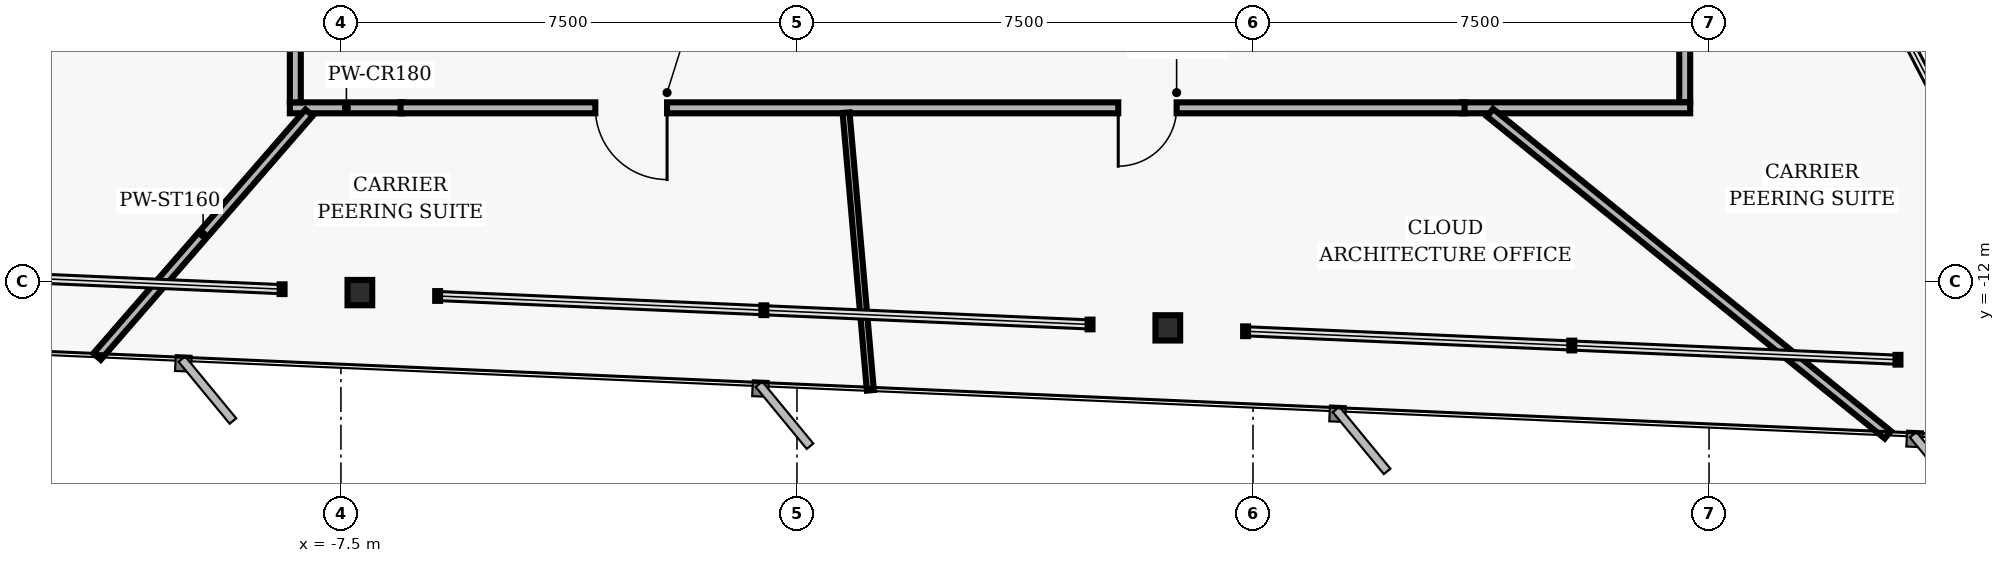
"""IFC4 building model, lengths in metres.
Left out: names, types, materials, properties, quantities, classifications, styles, units other than length and angle.
Written with IfcOpenShell. Run it as: python <this file> out.ifc"""

import sys

from ifc_helpers import new_model, si_unit, direction, frame, frame_2d, origin, origin_2d, place, context, subcontext, project, spatial, rectangle, i_section, extrude, element, fill, save


model = new_model("IFC4")
c1 = context("Model", 3, precision=1e-05, world=origin(), true_north=direction((0.0, 1.0)))
c2 = subcontext(c1, "Body", "Model", "MODEL_VIEW")
j1 = project(units=[si_unit("LENGTHUNIT", "METRE"), si_unit("PLANEANGLEUNIT", "RADIAN")], contexts=[c1])
p1 = place(None, origin())
s1 = spatial("IfcSite", under=j1, at=p1, CompositionType="ELEMENT")
p2 = place(p1, origin())
s2 = spatial("IfcBuilding", under=s1, at=p2, CompositionType="ELEMENT")
p3 = place(p2, frame((0.0, 0.0, 132.0)))
s3 = spatial("IfcBuildingStorey", under=s2, at=p3, CompositionType="ELEMENT", Elevation=132.0)
for number, where, z_axis, x_axis in (
    (1, (-7.188, -12.189, 0.0), (0.0, 0.0, 1.0), (1.0, 0.0, 0.0)),
    (2, (6.099, -12.769, 0.0), (0.0, 0.0, 1.0), (1.0, 0.0, 0.0)),
):
    element("IfcColumn", number, at=place(p3, frame(where, z_axis=z_axis, x_axis=x_axis)), inside=s3, PredefinedType="COLUMN", context=c2, shape_type="SweptSolid", body=[
        extrude(i_section(OverallWidth=0.406, OverallDepth=0.416, WebThickness=0.03, FlangeThickness=0.048, FilletRadius=0.02, at=origin_2d()), origin(), (0.0, 0.0, 1.0), 3.04),
    ])
p4 = place(p3, frame((-6.48, -9.15, 0.0), z_axis=(0.0, 0.0, 1.0), x_axis=(-1.0, 0.0, 0.0)))
e3 = element("IfcWall", 3, at=p4, inside=s3, PredefinedType="PARTITIONING", context=c2, shape_type="SweptSolid", body=[
    extrude(rectangle(XDim=1.86, YDim=0.18, at=frame_2d((0.93, 0.0))), origin(), (0.0, 0.0, 1.0), 2.33),
])
for number, where, z_axis, x_axis in (
    (4, (-8.25, -9.06, 0.0), (0.0, 0.0, 1.0), (0.0, 1.0, 0.0)),
    (5, (14.6, -7.18, 0.0), (0.0, 0.0, 1.0), (0.0, -1.0, 0.0)),
):
    element("IfcWall", number, at=place(p3, frame(where, z_axis=z_axis, x_axis=x_axis)), inside=s3, PredefinedType="PARTITIONING", context=c2, shape_type="SweptSolid", body=[
        extrude(rectangle(XDim=1.88, YDim=0.18, at=frame_2d((0.94, 0.0))), origin(), (0.0, 0.0, 1.0), 2.763),
    ])
p5 = place(p3, frame((14.69, -9.15, 0.0), z_axis=(0.0, 0.0, 1.0), x_axis=(-1.0, 0.0, 0.0)))
e6 = element("IfcWall", 6, at=p5, inside=s3, PredefinedType="PARTITIONING", context=c2, shape_type="SweptSolid", body=[
    extrude(rectangle(XDim=3.75, YDim=0.18, at=frame_2d((1.875, 0.0))), origin(), (0.0, 0.0, 1.0), 2.33),
])
p6 = place(p3, frame((10.98, -9.15, 0.0), z_axis=(0.0, 0.0, 1.0), x_axis=(-1.0, 0.0, 0.0)))
e7 = element("IfcWall", 7, at=p6, inside=s3, PredefinedType="PARTITIONING", context=c2, shape_type="SweptSolid", body=[
    extrude(rectangle(XDim=17.5, YDim=0.18, at=frame_2d((8.75, 0.0))), origin(), (0.0, 0.0, 1.0), 2.33),
])
p7 = place(p6, frame((13.116, 0.0, 0.0)))
e8 = element("IfcOpeningElement", 8, at=p7, cuts=e7, PredefinedType="OPENING", context=c2, shape_type="SweptSolid", body=[
    extrude(rectangle(XDim=1.18, YDim=2.02, at=frame_2d((0.59, 1.01))), frame((0.0, 0.1, 0.0), z_axis=(0.0, -1.0, 0.0), x_axis=(1.0, 0.0, 0.0)), (0.0, 0.0, 1.0), 0.2),
])
p8 = place(p6, frame((4.736, 0.0, 0.0)))
e9 = element("IfcOpeningElement", 9, at=p8, cuts=e7, PredefinedType="OPENING", context=c2, shape_type="SweptSolid", body=[
    extrude(rectangle(XDim=0.96, YDim=2.02, at=frame_2d((0.48, 1.01))), frame((0.0, 0.1, 0.0), z_axis=(0.0, -1.0, 0.0), x_axis=(1.0, 0.0, 0.0)), (0.0, 0.0, 1.0), 0.2),
])
p9 = place(p3, frame((-8.023, -9.23, 0.0), z_axis=(0.0, 0.0, 1.0), x_axis=(-0.656052478168, -0.754715274716, 0.0)))
e10 = element("IfcWall", 10, at=p9, inside=s3, PredefinedType="PARTITIONING", context=c2, shape_type="SweptSolid", body=[
    extrude(rectangle(XDim=5.315, YDim=0.16, at=frame_2d((2.658, 0.0))), origin(), (0.0, 0.0, 1.0), 2.763),
])
p10 = place(p3, frame((0.808, -9.23, 0.0), z_axis=(0.0, 0.0, 1.0), x_axis=(0.087130613331, -0.996196896311, 0.0)))
e11 = element("IfcWall", 11, at=p10, inside=s3, PredefinedType="MOVABLE", context=c2, shape_type="SweptSolid", body=[
    extrude(rectangle(XDim=4.584, YDim=0.115, at=frame_2d((2.292, 0.0))), origin(), (0.0, 0.0, 1.0), 2.763),
])
p11 = place(p3, frame((11.398, -9.23, 0.0), z_axis=(0.0, 0.0, 1.0), x_axis=(0.777150974354, -0.629314200588, 0.0)))
e12 = element("IfcWall", 12, at=p11, inside=s3, PredefinedType="PARTITIONING", context=c2, shape_type="SweptSolid", body=[
    extrude(rectangle(XDim=8.417, YDim=0.16, at=frame_2d((4.208, 0.0))), origin(), (0.0, 0.0, 1.0), 2.763),
])
p12 = place(p7, origin())
e13 = element("IfcDoor", 13, at=p12, inside=s3, OperationType="SINGLE_SWING_LEFT", PredefinedType="DOOR", context=c2, shape_type="SweptSolid", body=[
    extrude(rectangle(XDim=1.18, YDim=2.02, at=frame_2d((0.59, 1.01))), frame((0.0, 0.025, 0.0), z_axis=(0.0, -1.0, 0.0), x_axis=(1.0, 0.0, 0.0)), (0.0, 0.0, 1.0), 0.05),
])
fill(e8, e13)
p13 = place(p8, origin())
e14 = element("IfcDoor", 14, at=p13, inside=s3, OperationType="SINGLE_SWING_RIGHT", PredefinedType="DOOR", context=c2, shape_type="SweptSolid", body=[
    extrude(rectangle(XDim=0.96, YDim=2.02, at=frame_2d((0.48, 1.01))), frame((0.0, 0.025, 0.0), z_axis=(0.0, -1.0, 0.0), x_axis=(1.0, 0.0, 0.0)), (0.0, 0.0, 1.0), 0.05),
])
fill(e9, e14)
save(model, sys.argv[1])
